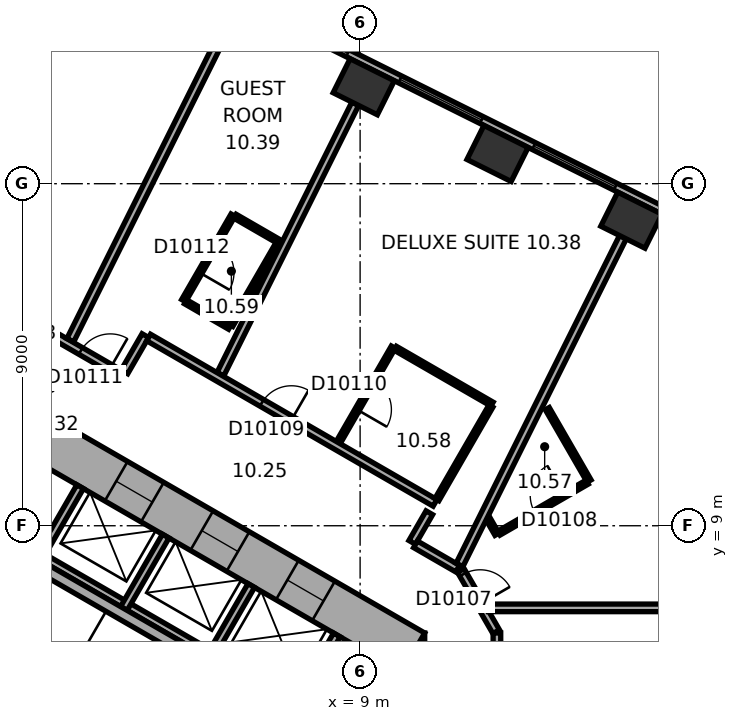
"""IFC4 building model, lengths in metres.
Left out: names, types, materials, properties, quantities, classifications, styles, units other than length and angle.
Written with IfcOpenShell. Run it as: python <this file> out.ifc"""

import sys

from ifc_helpers import new_model, si_unit, direction, frame, frame_2d, origin, origin_2d, place, context, subcontext, project, spatial, rectangle, extrude, element, fill, save


model = new_model("IFC4")
c1 = context("Model", 3, precision=1e-05, world=origin(), true_north=direction((0.0, 1.0)))
c2 = subcontext(c1, "Body", "Model", "MODEL_VIEW")
j1 = project(units=[si_unit("LENGTHUNIT", "METRE"), si_unit("PLANEANGLEUNIT", "RADIAN")], contexts=[c1])
p1 = place(None, origin())
s1 = spatial("IfcSite", under=j1, at=p1, CompositionType="ELEMENT")
p2 = place(p1, origin())
s2 = spatial("IfcBuilding", under=s1, at=p2, CompositionType="ELEMENT")
p3 = place(p2, frame((0.0, 0.0, 53.9)))
s3 = spatial("IfcBuildingStorey", under=s2, at=p3, CompositionType="ELEMENT", Elevation=53.9)
for number, where, z_axis, x_axis in (
    (1, (16.138, 17.04, 0.0), (0.0, 0.0, 1.0), (-0.895, 0.446, 0.0)),
    (2, (12.616, 18.795, 0.0), (0.0, 0.0, 1.0), (-0.895, 0.446, 0.0)),
    (3, (9.095, 20.551, 0.0), (0.0, 0.0, 1.0), (-0.895, 0.446, 0.0)),
):
    element("IfcColumn", number, at=place(p3, frame(where, z_axis=z_axis, x_axis=x_axis)), inside=s3, PredefinedType="COLUMN", context=c2, shape_type="SweptSolid", body=[
        extrude(rectangle(XDim=1.3, YDim=1.0, at=origin_2d()), origin(), (0.0, 0.0, 1.0), 3.3),
    ])
p4 = place(p3, frame((10.1, -6.177, 0.0), z_axis=(0.0, 0.0, 1.0), x_axis=(0.0, 1.0, 0.0)))
e4 = element("IfcWall", 4, at=p4, inside=s3, PredefinedType="SHEAR", context=c2, shape_type="SweptSolid", body=[
    extrude(rectangle(XDim=12.355, YDim=1.2, at=frame_2d((6.177, 0.0))), origin(), (0.0, 0.0, 1.0), 3.3),
])
p5 = place(p4, frame((6.378, 0.0, 0.0)))
e5 = element("IfcOpeningElement", 5, at=p5, cuts=e4, PredefinedType="OPENING", context=c2, shape_type="SweptSolid", body=[
    extrude(rectangle(XDim=1.5, YDim=2.1, at=frame_2d((0.75, 1.05))), frame((0.0, 0.61, 0.0), z_axis=(0.0, -1.0, 0.0), x_axis=(1.0, 0.0, 0.0)), (0.0, 0.0, 1.0), 1.22),
])
p6 = place(p4, frame((1.828, 0.0, 0.0)))
e6 = element("IfcOpeningElement", 6, at=p6, cuts=e4, PredefinedType="OPENING", context=c2, shape_type="SweptSolid", body=[
    extrude(rectangle(XDim=1.1, YDim=2.1, at=frame_2d((0.55, 1.05))), frame((0.0, 0.61, 0.0), z_axis=(0.0, -1.0, 0.0), x_axis=(1.0, 0.0, 0.0)), (0.0, 0.0, 1.0), 1.22),
])
p7 = place(p4, frame((4.427, 0.0, 0.0)))
e7 = element("IfcOpeningElement", 7, at=p7, cuts=e4, PredefinedType="OPENING", context=c2, shape_type="SweptSolid", body=[
    extrude(rectangle(XDim=1.1, YDim=2.1, at=frame_2d((0.55, 1.05))), frame((0.0, 0.61, 0.0), z_axis=(0.0, -1.0, 0.0), x_axis=(1.0, 0.0, 0.0)), (0.0, 0.0, 1.0), 1.22),
])
p8 = place(p3, frame((10.4, 5.658, 0.0), z_axis=(0.0, 0.0, 1.0), x_axis=(-0.866021384402, 0.500006961711, 0.0)))
e8 = element("IfcWall", 8, at=p8, inside=s3, PredefinedType="SHEAR", context=c2, shape_type="SweptSolid", body=[
    extrude(rectangle(XDim=12.355, YDim=1.2, at=frame_2d((6.178, 0.0))), origin(), (0.0, 0.0, 1.0), 3.3),
])
p9 = place(p8, frame((2.728, 0.0, 0.0)))
e9 = element("IfcOpeningElement", 9, at=p9, cuts=e8, PredefinedType="OPENING", context=c2, shape_type="SweptSolid", body=[
    extrude(rectangle(XDim=1.1, YDim=2.1, at=frame_2d((0.55, 1.05))), frame((0.0, 0.61, 0.0), z_axis=(0.0, -1.0, 0.0), x_axis=(1.0, 0.0, 0.0)), (0.0, 0.0, 1.0), 1.22),
])
p10 = place(p8, frame((5.328, 0.0, 0.0)))
e10 = element("IfcOpeningElement", 10, at=p10, cuts=e8, PredefinedType="OPENING", context=c2, shape_type="SweptSolid", body=[
    extrude(rectangle(XDim=1.1, YDim=2.1, at=frame_2d((0.55, 1.05))), frame((0.0, 0.61, 0.0), z_axis=(0.0, -1.0, 0.0), x_axis=(1.0, 0.0, 0.0)), (0.0, 0.0, 1.0), 1.22),
])
p11 = place(p8, frame((7.928, 0.0, 0.0)))
e11 = element("IfcOpeningElement", 11, at=p11, cuts=e8, PredefinedType="OPENING", context=c2, shape_type="SweptSolid", body=[
    extrude(rectangle(XDim=1.1, YDim=2.1, at=frame_2d((0.55, 1.05))), frame((0.0, 0.61, 0.0), z_axis=(0.0, -1.0, 0.0), x_axis=(1.0, 0.0, 0.0)), (0.0, 0.0, 1.0), 1.22),
])
p12 = place(p3, frame((20.63, 15.47, 0.0), z_axis=(0.0, 0.0, 1.0), x_axis=(-0.894934518609, 0.446197498203, 0.0)))
e12 = element("IfcWall", 12, at=p12, inside=s3, PredefinedType="STANDARD", context=c2, shape_type="SweptSolid", body=[
    extrude(rectangle(XDim=21.246, YDim=0.2, at=frame_2d((10.623, 0.0))), origin(), (0.0, 0.0, 1.0), 3.3),
])
p13 = place(p12, frame((1.553, 0.0, 0.8)))
e13 = element("IfcOpeningElement", 13, at=p13, cuts=e12, PredefinedType="OPENING", context=c2, shape_type="SweptSolid", body=[
    extrude(rectangle(XDim=2.4, YDim=1.7, at=frame_2d((1.2, 0.85))), frame((0.0, 0.11, 0.0), z_axis=(0.0, -1.0, 0.0), x_axis=(1.0, 0.0, 0.0)), (0.0, 0.0, 1.0), 0.22),
])
p14 = place(p12, frame((5.488, 0.0, 0.8)))
e14 = element("IfcOpeningElement", 14, at=p14, cuts=e12, PredefinedType="OPENING", context=c2, shape_type="SweptSolid", body=[
    extrude(rectangle(XDim=2.4, YDim=1.7, at=frame_2d((1.2, 0.85))), frame((0.0, 0.11, 0.0), z_axis=(0.0, -1.0, 0.0), x_axis=(1.0, 0.0, 0.0)), (0.0, 0.0, 1.0), 0.22),
])
p15 = place(p12, frame((9.422, 0.0, 0.8)))
e15 = element("IfcOpeningElement", 15, at=p15, cuts=e12, PredefinedType="OPENING", context=c2, shape_type="SweptSolid", body=[
    extrude(rectangle(XDim=2.4, YDim=1.7, at=frame_2d((1.2, 0.85))), frame((0.0, 0.11, 0.0), z_axis=(0.0, -1.0, 0.0), x_axis=(1.0, 0.0, 0.0)), (0.0, 0.0, 1.0), 0.22),
])
p16 = place(p12, frame((13.357, 0.0, 0.8)))
e16 = element("IfcOpeningElement", 16, at=p16, cuts=e12, PredefinedType="OPENING", context=c2, shape_type="SweptSolid", body=[
    extrude(rectangle(XDim=2.4, YDim=1.7, at=frame_2d((1.2, 0.85))), frame((0.0, 0.11, 0.0), z_axis=(0.0, -1.0, 0.0), x_axis=(1.0, 0.0, 0.0)), (0.0, 0.0, 1.0), 0.22),
])
p17 = place(p12, frame((17.292, 0.0, 0.8)))
e17 = element("IfcOpeningElement", 17, at=p17, cuts=e12, PredefinedType="OPENING", context=c2, shape_type="SweptSolid", body=[
    extrude(rectangle(XDim=2.4, YDim=1.7, at=frame_2d((1.2, 0.85))), frame((0.0, 0.11, 0.0), z_axis=(0.0, -1.0, 0.0), x_axis=(1.0, 0.0, 0.0)), (0.0, 0.0, 1.0), 0.22),
])
p18 = place(p3, frame((7.424, 4.259, 0.0), z_axis=(0.0, 0.0, 1.0), x_axis=(-0.866026010844, 0.49999894854, 0.0)))
e18 = element("IfcWall", 18, at=p18, inside=s3, PredefinedType="PARTITIONING", context=c2, shape_type="SweptSolid", body=[
    extrude(rectangle(XDim=8.0, YDim=0.2, at=frame_2d((4.0, 0.0))), origin(), (0.0, 0.0, 1.0), 3.05),
])
for number, where, z_axis, x_axis in (
    (19, (7.287, 4.222, 0.0), (0.0, 0.0, 1.0), (0.5, 0.866, 0.0)),
    (20, (5.036, 5.522, 0.0), (0.0, 0.0, 1.0), (0.5, 0.866, 0.0)),
    (21, (2.784, 6.822, 0.0), (0.0, 0.0, 1.0), (0.5, 0.866, 0.0)),
    (22, (0.532, 8.122, 0.0), (0.0, 0.0, 1.0), (0.5, 0.866, 0.0)),
):
    element("IfcWall", number, at=place(p3, frame(where, z_axis=z_axis, x_axis=x_axis)), inside=s3, PredefinedType="PARTITIONING", context=c2, shape_type="SweptSolid", body=[
        extrude(rectangle(XDim=2.2, YDim=0.2, at=frame_2d((1.1, 0.0))), origin(), (0.0, 0.0, 1.0), 3.05),
    ])
p19 = place(p3, frame((6.303, 4.617, 0.0), z_axis=(0.0, 0.0, 1.0), x_axis=(-0.866027801685, 0.499995846692, 0.0)))
e23 = element("IfcWall", 23, at=p19, inside=s3, PredefinedType="SHEAR", context=c2, shape_type="SweptSolid", body=[
    extrude(rectangle(XDim=7.06, YDim=0.3, at=frame_2d((3.53, 0.0))), origin(), (0.0, 0.0, 1.0), 3.05),
])
p20 = place(p3, frame((0.95, 14.001, 0.0), z_axis=(0.0, 0.0, 1.0), x_axis=(-1.0, 0.0, 0.0)))
e24 = element("IfcWall", 24, at=p20, inside=s3, PredefinedType="PARTITIONING", context=c2, shape_type="SweptSolid", body=[
    extrude(rectangle(XDim=1.86, YDim=0.2, at=frame_2d((0.93, 0.0))), origin(), (0.0, 0.0, 1.0), 3.05),
])
p21 = place(p20, frame((0.48, 0.0, 0.0)))
e25 = element("IfcOpeningElement", 25, at=p21, cuts=e24, PredefinedType="OPENING", context=c2, shape_type="SweptSolid", body=[
    extrude(rectangle(XDim=0.9, YDim=2.1, at=frame_2d((0.45, 1.05))), frame((0.0, 0.11, 0.0), z_axis=(0.0, -1.0, 0.0), x_axis=(1.0, 0.0, 0.0)), (0.0, 0.0, 1.0), 0.22),
])
p22 = place(p3, frame((2.748, 12.962, 0.0), z_axis=(0.0, 0.0, 1.0), x_axis=(-0.866013897511, 0.50001992892, 0.0)))
e26 = element("IfcWall", 26, at=p22, inside=s3, PredefinedType="PARTITIONING", context=c2, shape_type="SweptSolid", body=[
    extrude(rectangle(XDim=2.037, YDim=0.2, at=frame_2d((1.018, 0.0))), origin(), (0.0, 0.0, 1.0), 3.05),
])
p23 = place(p22, frame((0.372, 0.0, 0.0)))
e27 = element("IfcOpeningElement", 27, at=p23, cuts=e26, PredefinedType="OPENING", context=c2, shape_type="SweptSolid", body=[
    extrude(rectangle(XDim=0.9, YDim=2.1, at=frame_2d((0.45, 1.05))), frame((0.0, 0.11, 0.0), z_axis=(0.0, -1.0, 0.0), x_axis=(1.0, 0.0, 0.0)), (0.0, 0.0, 1.0), 0.22),
])
p24 = place(p3, frame((3.349, 14.002, 0.0), z_axis=(0.0, 0.0, 1.0), x_axis=(-0.500074377092, -0.865982457891, 0.0)))
e28 = element("IfcWall", 28, at=p24, inside=s3, PredefinedType="PARTITIONING", context=c2, shape_type="SweptSolid", body=[
    extrude(rectangle(XDim=1.101, YDim=0.2, at=frame_2d((0.55, 0.0))), origin(), (0.0, 0.0, 1.0), 3.05),
])
p25 = place(p3, frame((4.356, 14.922, 0.0), z_axis=(0.0, 0.0, 1.0), x_axis=(0.499936506574, 0.866062058628, 0.0)))
e29 = element("IfcWall", 29, at=p25, inside=s3, PredefinedType="PARTITIONING", context=c2, shape_type="SweptSolid", body=[
    extrude(rectangle(XDim=2.6, YDim=0.12, at=frame_2d((1.3, 0.0))), origin(), (0.0, 0.0, 1.0), 3.05),
])
p26 = place(p25, frame((0.85, 0.0, 0.0)))
e30 = element("IfcOpeningElement", 30, at=p26, cuts=e29, PredefinedType="OPENING", context=c2, shape_type="SweptSolid", body=[
    extrude(rectangle(XDim=0.9, YDim=2.1, at=frame_2d((0.45, 1.05))), frame((0.0, 0.07, 0.0), z_axis=(0.0, -1.0, 0.0), x_axis=(1.0, 0.0, 0.0)), (0.0, 0.0, 1.0), 0.14),
])
p27 = place(p3, frame((5.351, 21.859, 0.0), z_axis=(0.0, 0.0, 1.0), x_axis=(-0.446205309328, -0.894930624086, 0.0)))
e31 = element("IfcWall", 31, at=p27, inside=s3, PredefinedType="PARTITIONING", context=c2, shape_type="SweptSolid", body=[
    extrude(rectangle(XDim=8.913, YDim=0.2, at=frame_2d((4.457, 0.0))), origin(), (0.0, 0.0, 1.0), 2.6),
])
p28 = place(p3, frame((5.569, 14.222, 0.0), z_axis=(0.0, 0.0, 1.0), x_axis=(-0.866036909293, 0.499980071345, 0.0)))
e32 = element("IfcWall", 32, at=p28, inside=s3, PredefinedType="PARTITIONING", context=c2, shape_type="SweptSolid", body=[
    extrude(rectangle(XDim=1.34, YDim=0.12, at=frame_2d((0.67, 0.0))), origin(), (0.0, 0.0, 1.0), 3.05),
])
p29 = place(p3, frame((5.708, 17.144, 0.0), z_axis=(0.0, 0.0, 1.0), x_axis=(0.866082447003, -0.499901185229, 0.0)))
e33 = element("IfcWall", 33, at=p29, inside=s3, PredefinedType="PARTITIONING", context=c2, shape_type="SweptSolid", body=[
    extrude(rectangle(XDim=1.34, YDim=0.12, at=frame_2d((0.67, 0.0))), origin(), (0.0, 0.0, 1.0), 3.05),
])
p30 = place(p3, frame((6.839, 16.422, 0.0), z_axis=(0.0, 0.0, 1.0), x_axis=(-0.50000366821, -0.866023285932, 0.0)))
e34 = element("IfcWall", 34, at=p30, inside=s3, PredefinedType="PARTITIONING", context=c2, shape_type="SweptSolid", body=[
    extrude(rectangle(XDim=2.48, YDim=0.12, at=frame_2d((1.24, 0.0))), origin(), (0.0, 0.0, 1.0), 3.05),
])
p31 = place(p3, frame((8.424, 11.188, 0.0), z_axis=(0.0, 0.0, 1.0), x_axis=(0.49995078051, 0.866053818805, 0.0)))
e35 = element("IfcWall", 35, at=p31, inside=s3, PredefinedType="PARTITIONING", context=c2, shape_type="SweptSolid", body=[
    extrude(rectangle(XDim=2.9, YDim=0.12, at=frame_2d((1.45, 0.0))), origin(), (0.0, 0.0, 1.0), 3.05),
])
p32 = place(p31, frame((1.0, 0.0, 0.0)))
e36 = element("IfcOpeningElement", 36, at=p32, cuts=e35, PredefinedType="OPENING", context=c2, shape_type="SweptSolid", body=[
    extrude(rectangle(XDim=0.9, YDim=2.1, at=frame_2d((0.45, 1.05))), frame((0.0, 0.07, 0.0), z_axis=(0.0, -1.0, 0.0), x_axis=(1.0, 0.0, 0.0)), (0.0, 0.0, 1.0), 0.14),
])
p33 = place(p3, frame((8.872, 20.104, 0.0), z_axis=(0.0, 0.0, 1.0), x_axis=(-0.446218378653, -0.894924107706, 0.0)))
e37 = element("IfcWall", 37, at=p33, inside=s3, PredefinedType="PARTITIONING", context=c2, shape_type="SweptSolid", body=[
    extrude(rectangle(XDim=7.95, YDim=0.2, at=frame_2d((3.975, 0.0))), origin(), (0.0, 0.0, 1.0), 3.05),
])
p34 = place(p3, frame((9.926, 13.67, 0.0), z_axis=(0.0, 0.0, 1.0), x_axis=(0.866032090307, -0.499988418424, 0.0)))
e38 = element("IfcWall", 38, at=p34, inside=s3, PredefinedType="PARTITIONING", context=c2, shape_type="SweptSolid", body=[
    extrude(rectangle(XDim=2.94, YDim=0.12, at=frame_2d((1.47, 0.0))), origin(), (0.0, 0.0, 1.0), 3.05),
])
p35 = place(p3, frame((10.371, 8.561, 0.0), z_axis=(0.0, 0.0, 1.0), x_axis=(0.50004290449, 0.866000631449, 0.0)))
e39 = element("IfcWall", 39, at=p35, inside=s3, PredefinedType="PARTITIONING", context=c2, shape_type="SweptSolid", body=[
    extrude(rectangle(XDim=0.901, YDim=0.2, at=frame_2d((0.451, 0.0))), origin(), (0.0, 0.0, 1.0), 3.05),
])
p36 = place(p3, frame((10.972, 9.602, 0.0), z_axis=(0.0, 0.0, 1.0), x_axis=(-0.866033277307, 0.499986362411, 0.0)))
e40 = element("IfcWall", 40, at=p36, inside=s3, PredefinedType="PARTITIONING", context=c2, shape_type="SweptSolid", body=[
    extrude(rectangle(XDim=8.702, YDim=0.2, at=frame_2d((4.351, 0.0))), origin(), (0.0, 0.0, 1.0), 3.05),
])
p37 = place(p36, frame((4.364, 0.0, 0.0)))
e41 = element("IfcOpeningElement", 41, at=p37, cuts=e40, PredefinedType="OPENING", context=c2, shape_type="SweptSolid", body=[
    extrude(rectangle(XDim=0.9, YDim=2.1, at=frame_2d((0.45, 1.05))), frame((0.0, 0.11, 0.0), z_axis=(0.0, -1.0, 0.0), x_axis=(1.0, 0.0, 0.0)), (0.0, 0.0, 1.0), 0.22),
])
p38 = place(p3, frame((11.566, 7.871, 0.0), z_axis=(0.0, 0.0, 1.0), x_axis=(-0.866004557827, 0.500036104519, 0.0)))
e42 = element("IfcWall", 42, at=p38, inside=s3, PredefinedType="PARTITIONING", context=c2, shape_type="SweptSolid", body=[
    extrude(rectangle(XDim=1.28, YDim=0.2, at=frame_2d((0.64, 0.0))), origin(), (0.0, 0.0, 1.0), 3.05),
])
p39 = place(p3, frame((12.442, 12.148, 0.0), z_axis=(0.0, 0.0, 1.0), x_axis=(-0.49994816717, -0.866055327414, 0.0)))
e43 = element("IfcWall", 43, at=p39, inside=s3, PredefinedType="PARTITIONING", context=c2, shape_type="SweptSolid", body=[
    extrude(rectangle(XDim=2.84, YDim=0.12, at=frame_2d((1.42, 0.0))), origin(), (0.0, 0.0, 1.0), 3.05),
])
p40 = place(p3, frame((12.58, 6.212, 0.0), z_axis=(0.0, 0.0, 1.0), x_axis=(-0.500063286585, 0.865988862174, 0.0)))
e44 = element("IfcWall", 44, at=p40, inside=s3, PredefinedType="PARTITIONING", context=c2, shape_type="SweptSolid", body=[
    extrude(rectangle(XDim=1.86, YDim=0.2, at=frame_2d((0.93, 0.0))), origin(), (0.0, 0.0, 1.0), 3.05),
])
p41 = place(p40, frame((0.842, 0.0, 0.0)))
e45 = element("IfcOpeningElement", 45, at=p41, cuts=e44, PredefinedType="OPENING", context=c2, shape_type="SweptSolid", body=[
    extrude(rectangle(XDim=0.9, YDim=2.1, at=frame_2d((0.45, 1.05))), frame((0.0, 0.11, 0.0), z_axis=(0.0, -1.0, 0.0), x_axis=(1.0, 0.0, 0.0)), (0.0, 0.0, 1.0), 0.22),
])
p42 = place(p3, frame((12.6, 3.004, 0.0), z_axis=(0.0, 0.0, 1.0), x_axis=(0.0, 1.0, 0.0)))
e46 = element("IfcWall", 46, at=p42, inside=s3, PredefinedType="PARTITIONING", context=c2, shape_type="SweptSolid", body=[
    extrude(rectangle(XDim=3.173, YDim=0.2, at=frame_2d((1.586, 0.0))), origin(), (0.0, 0.0, 1.0), 3.05),
])
p43 = place(p42, frame((1.998, 0.0, 0.0)))
e47 = element("IfcOpeningElement", 47, at=p43, cuts=e46, PredefinedType="OPENING", context=c2, shape_type="SweptSolid", body=[
    extrude(rectangle(XDim=0.9, YDim=2.1, at=frame_2d((0.45, 1.05))), frame((0.0, 0.11, 0.0), z_axis=(0.0, -1.0, 0.0), x_axis=(1.0, 0.0, 0.0)), (0.0, 0.0, 1.0), 0.22),
])
p44 = place(p3, frame((12.601, 8.776, 0.0), z_axis=(0.0, 0.0, 1.0), x_axis=(-0.500166486798, 0.865929261247, 0.0)))
e48 = element("IfcWall", 48, at=p44, inside=s3, PredefinedType="PARTITIONING", context=c2, shape_type="SweptSolid", body=[
    extrude(rectangle(XDim=0.476, YDim=0.12, at=frame_2d((0.238, 0.0))), origin(), (0.0, 0.0, 1.0), 3.05),
])
p45 = place(p3, frame((13.926, 12.081, 0.0), z_axis=(0.0, 0.0, 1.0), x_axis=(0.499994660107, -0.866028486751, 0.0)))
e49 = element("IfcWall", 49, at=p45, inside=s3, PredefinedType="PARTITIONING", context=c2, shape_type="SweptSolid", body=[
    extrude(rectangle(XDim=2.2, YDim=0.12, at=frame_2d((1.1, 0.0))), origin(), (0.0, 0.0, 1.0), 3.05),
])
p46 = place(p3, frame((14.974, 10.146, 0.0), z_axis=(0.0, 0.0, 1.0), x_axis=(-0.86599746015, -0.500048396672, 0.0)))
e50 = element("IfcWall", 50, at=p46, inside=s3, PredefinedType="PARTITIONING", context=c2, shape_type="SweptSolid", body=[
    extrude(rectangle(XDim=2.68, YDim=0.12, at=frame_2d((1.34, 0.0))), origin(), (0.0, 0.0, 1.0), 3.05),
])
p47 = place(p46, frame((0.69, 0.0, 0.0)))
e51 = element("IfcOpeningElement", 51, at=p47, cuts=e50, PredefinedType="OPENING", context=c2, shape_type="SweptSolid", body=[
    extrude(rectangle(XDim=0.9, YDim=2.1, at=frame_2d((0.45, 1.05))), frame((0.0, 0.07, 0.0), z_axis=(0.0, -1.0, 0.0), x_axis=(1.0, 0.0, 0.0)), (0.0, 0.0, 1.0), 0.14),
])
p48 = place(p3, frame((15.915, 16.592, 0.0), z_axis=(0.0, 0.0, 1.0), x_axis=(-0.446199736347, -0.894933402709, 0.0)))
e52 = element("IfcWall", 52, at=p48, inside=s3, PredefinedType="PARTITIONING", context=c2, shape_type="SweptSolid", body=[
    extrude(rectangle(XDim=9.635, YDim=0.2, at=frame_2d((4.817, 0.0))), origin(), (0.0, 0.0, 1.0), 3.05),
])
p49 = place(p3, frame((21.95, 6.839, 0.0), z_axis=(0.0, 0.0, 1.0), x_axis=(-1.0, 0.0, 0.0)))
e53 = element("IfcWall", 53, at=p49, inside=s3, PredefinedType="PARTITIONING", context=c2, shape_type="SweptSolid", body=[
    extrude(rectangle(XDim=9.572, YDim=0.2, at=frame_2d((4.786, 0.0))), origin(), (0.0, 0.0, 1.0), 3.05),
])
p50 = place(p14, origin())
e54 = element("IfcWindow", 54, at=p50, inside=s3, PartitioningType="SINGLE_PANEL", PredefinedType="WINDOW", context=c2, shape_type="SweptSolid", body=[
    extrude(rectangle(XDim=2.4, YDim=1.7, at=frame_2d((1.2, 0.85))), frame((0.0, 0.03, 0.0), z_axis=(0.0, -1.0, 0.0), x_axis=(1.0, 0.0, 0.0)), (0.0, 0.0, 1.0), 0.06),
])
fill(e14, e54)
p51 = place(p15, origin())
e55 = element("IfcWindow", 55, at=p51, inside=s3, PartitioningType="SINGLE_PANEL", PredefinedType="WINDOW", context=c2, shape_type="SweptSolid", body=[
    extrude(rectangle(XDim=2.4, YDim=1.7, at=frame_2d((1.2, 0.85))), frame((0.0, 0.03, 0.0), z_axis=(0.0, -1.0, 0.0), x_axis=(1.0, 0.0, 0.0)), (0.0, 0.0, 1.0), 0.06),
])
fill(e15, e55)
p52 = place(p16, origin())
e56 = element("IfcWindow", 56, at=p52, inside=s3, PartitioningType="SINGLE_PANEL", PredefinedType="WINDOW", context=c2, shape_type="SweptSolid", body=[
    extrude(rectangle(XDim=2.4, YDim=1.7, at=frame_2d((1.2, 0.85))), frame((0.0, 0.03, 0.0), z_axis=(0.0, -1.0, 0.0), x_axis=(1.0, 0.0, 0.0)), (0.0, 0.0, 1.0), 0.06),
])
fill(e16, e56)
p53 = place(p9, origin())
e57 = element("IfcDoor", 57, at=p53, inside=s3, OperationType="DOUBLE_DOOR_SLIDING", PredefinedType="DOOR", context=c2, shape_type="SweptSolid", body=[
    extrude(rectangle(XDim=1.1, YDim=2.1, at=frame_2d((0.55, 1.05))), frame((0.0, 0.025, 0.0), z_axis=(0.0, -1.0, 0.0), x_axis=(1.0, 0.0, 0.0)), (0.0, 0.0, 1.0), 0.05),
])
fill(e9, e57)
p54 = place(p10, origin())
e58 = element("IfcDoor", 58, at=p54, inside=s3, OperationType="DOUBLE_DOOR_SLIDING", PredefinedType="DOOR", context=c2, shape_type="SweptSolid", body=[
    extrude(rectangle(XDim=1.1, YDim=2.1, at=frame_2d((0.55, 1.05))), frame((0.0, 0.025, 0.0), z_axis=(0.0, -1.0, 0.0), x_axis=(1.0, 0.0, 0.0)), (0.0, 0.0, 1.0), 0.05),
])
fill(e10, e58)
p55 = place(p11, origin())
e59 = element("IfcDoor", 59, at=p55, inside=s3, OperationType="DOUBLE_DOOR_SLIDING", PredefinedType="DOOR", context=c2, shape_type="SweptSolid", body=[
    extrude(rectangle(XDim=1.1, YDim=2.1, at=frame_2d((0.55, 1.05))), frame((0.0, 0.025, 0.0), z_axis=(0.0, -1.0, 0.0), x_axis=(1.0, 0.0, 0.0)), (0.0, 0.0, 1.0), 0.05),
])
fill(e11, e59)
p56 = place(p41, origin())
e60 = element("IfcDoor", 60, at=p56, inside=s3, OperationType="SINGLE_SWING_LEFT", PredefinedType="DOOR", context=c2, shape_type="SweptSolid", body=[
    extrude(rectangle(XDim=0.9, YDim=2.1, at=frame_2d((0.45, 1.05))), frame((0.0, 0.025, 0.0), z_axis=(0.0, -1.0, 0.0), x_axis=(1.0, 0.0, 0.0)), (0.0, 0.0, 1.0), 0.05),
])
fill(e45, e60)
p57 = place(p47, origin())
e61 = element("IfcDoor", 61, at=p57, inside=s3, OperationType="SINGLE_SWING_LEFT", PredefinedType="DOOR", context=c2, shape_type="SweptSolid", body=[
    extrude(rectangle(XDim=0.9, YDim=2.1, at=frame_2d((0.45, 1.05))), frame((0.0, 0.025, 0.0), z_axis=(0.0, -1.0, 0.0), x_axis=(1.0, 0.0, 0.0)), (0.0, 0.0, 1.0), 0.05),
])
fill(e51, e61)
p58 = place(p37, origin())
e62 = element("IfcDoor", 62, at=p58, inside=s3, OperationType="SINGLE_SWING_LEFT", PredefinedType="DOOR", context=c2, shape_type="SweptSolid", body=[
    extrude(rectangle(XDim=0.9, YDim=2.1, at=frame_2d((0.45, 1.05))), frame((0.0, 0.025, 0.0), z_axis=(0.0, -1.0, 0.0), x_axis=(1.0, 0.0, 0.0)), (0.0, 0.0, 1.0), 0.05),
])
fill(e41, e62)
p59 = place(p32, origin())
e63 = element("IfcDoor", 63, at=p59, inside=s3, OperationType="SINGLE_SWING_LEFT", PredefinedType="DOOR", context=c2, shape_type="SweptSolid", body=[
    extrude(rectangle(XDim=0.9, YDim=2.1, at=frame_2d((0.45, 1.05))), frame((0.0, 0.025, 0.0), z_axis=(0.0, -1.0, 0.0), x_axis=(1.0, 0.0, 0.0)), (0.0, 0.0, 1.0), 0.05),
])
fill(e36, e63)
p60 = place(p23, origin())
e64 = element("IfcDoor", 64, at=p60, inside=s3, OperationType="SINGLE_SWING_LEFT", PredefinedType="DOOR", context=c2, shape_type="SweptSolid", body=[
    extrude(rectangle(XDim=0.9, YDim=2.1, at=frame_2d((0.45, 1.05))), frame((0.0, 0.025, 0.0), z_axis=(0.0, -1.0, 0.0), x_axis=(1.0, 0.0, 0.0)), (0.0, 0.0, 1.0), 0.05),
])
fill(e27, e64)
p61 = place(p26, origin())
e65 = element("IfcDoor", 65, at=p61, inside=s3, OperationType="SINGLE_SWING_LEFT", PredefinedType="DOOR", context=c2, shape_type="SweptSolid", body=[
    extrude(rectangle(XDim=0.9, YDim=2.1, at=frame_2d((0.45, 1.05))), frame((0.0, 0.025, 0.0), z_axis=(0.0, -1.0, 0.0), x_axis=(1.0, 0.0, 0.0)), (0.0, 0.0, 1.0), 0.05),
])
fill(e30, e65)
save(model, sys.argv[1])
